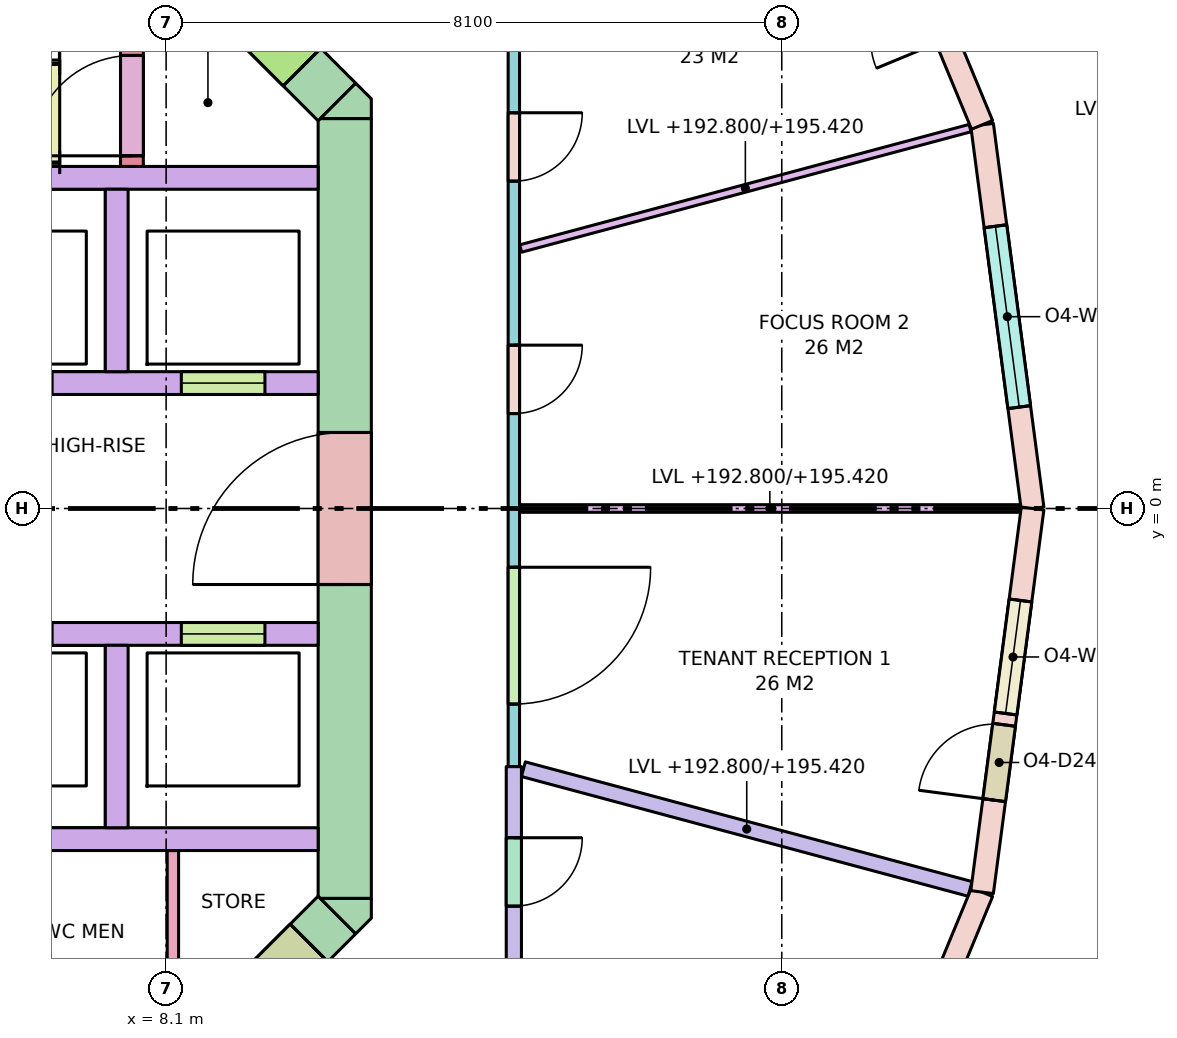
"""IFC4 building model, lengths in metres.
Left out: names, types, materials, properties, quantities, classifications, styles, units other than length and angle.
Written with IfcOpenShell. Run it as: python <this file> out.ifc"""

import sys

from ifc_helpers import new_model, si_unit, direction, frame, frame_2d, origin, place, context, subcontext, project, spatial, polyline, rectangle, outline, extrude, element, fill, save


model = new_model("IFC4")
c1 = context("Model", 3, precision=1e-05, world=origin(), true_north=direction((0.0, 1.0)))
c2 = subcontext(c1, "Body", "Model", "MODEL_VIEW")
j1 = project(units=[si_unit("LENGTHUNIT", "METRE"), si_unit("PLANEANGLEUNIT", "RADIAN")], contexts=[c1])
p1 = place(None, origin())
s1 = spatial("IfcSite", under=j1, at=p1, CompositionType="ELEMENT")
p2 = place(p1, origin())
s2 = spatial("IfcBuilding", under=s1, at=p2, CompositionType="ELEMENT")
p3 = place(p2, frame((0.0, 0.0, 192.8)))
s3 = spatial("IfcBuildingStorey", under=s2, at=p3, CompositionType="ELEMENT", Elevation=192.8)
p4 = place(p3, frame((10.45, -5.13, -0.28), z_axis=(0.0, 0.0, 1.0), x_axis=(0.0, 1.0, 0.0)))
e1 = element("IfcWall", 1, at=p4, inside=s3, PredefinedType="SHEAR", context=c2, shape_type="SweptSolid", body=[
    extrude(rectangle(XDim=10.26, YDim=0.7, at=frame_2d((5.13, 0.0))), origin(), (0.0, 0.0, 1.0), 3.7),
])
p5 = place(p4, frame((4.13, 0.0, 0.28)))
e2 = element("IfcOpeningElement", 2, at=p5, cuts=e1, PredefinedType="OPENING", context=c2, shape_type="SweptSolid", body=[
    extrude(rectangle(XDim=2.0, YDim=2.1, at=frame_2d((1.0, 1.05))), frame((0.0, 0.36, 0.0), z_axis=(0.0, -1.0, 0.0), x_axis=(1.0, 0.0, 0.0)), (0.0, 0.0, 1.0), 0.72),
])
p6 = place(p3, frame((7.347, 8.347, -0.28), z_axis=(0.0, 0.0, 1.0), x_axis=(0.707106781187, -0.707106781187, 0.0)))
e3 = element("IfcWall", 3, at=p6, inside=s3, PredefinedType="SHEAR", context=c2, shape_type="SweptSolid", body=[
    extrude(rectangle(XDim=4.243, YDim=0.7, at=frame_2d((2.121, 0.0))), origin(), (0.0, 0.0, 1.0), 3.7),
])
p7 = place(p6, frame((2.393, 0.0, 0.28)))
e4 = element("IfcOpeningElement", 4, at=p7, cuts=e3, PredefinedType="OPENING", context=c2, shape_type="SweptSolid", body=[
    extrude(rectangle(XDim=1.2, YDim=2.1, at=frame_2d((0.6, 1.05))), frame((0.0, 0.36, 0.0), z_axis=(0.0, -1.0, 0.0), x_axis=(1.0, 0.0, 0.0)), (0.0, 0.0, 1.0), 0.72),
])
p8 = place(p3, frame((10.347, -5.347, -0.28), z_axis=(0.0, 0.0, 1.0), x_axis=(-0.707106781187, -0.707106781187, 0.0)))
e5 = element("IfcWall", 5, at=p8, inside=s3, PredefinedType="SHEAR", context=c2, shape_type="SweptSolid", body=[
    extrude(rectangle(XDim=4.243, YDim=0.7, at=frame_2d((2.121, 0.0))), origin(), (0.0, 0.0, 1.0), 3.7),
])
p9 = place(p8, frame((2.823, 0.0, 0.28)))
e6 = element("IfcOpeningElement", 6, at=p9, cuts=e5, PredefinedType="OPENING", context=c2, shape_type="SweptSolid", body=[
    extrude(rectangle(XDim=0.9, YDim=2.1, at=frame_2d((0.45, 1.05))), frame((0.0, 0.36, 0.0), z_axis=(0.0, -1.0, 0.0), x_axis=(1.0, 0.0, 0.0)), (0.0, 0.0, 1.0), 0.72),
])
p10 = place(p8, frame((0.52, 0.0, 0.28)))
e7 = element("IfcOpeningElement", 7, at=p10, cuts=e5, PredefinedType="OPENING", context=c2, shape_type="SweptSolid", body=[
    extrude(rectangle(XDim=0.9, YDim=2.1, at=frame_2d((0.45, 1.05))), frame((0.0, 0.36, 0.0), z_axis=(0.0, -1.0, 0.0), x_axis=(1.0, 0.0, 0.0)), (0.0, 0.0, 1.0), 0.72),
])
p11 = place(p3, frame((0.0, 0.0, -0.28)))
e8 = element("IfcWall", 8, at=p11, inside=s3, PredefinedType="SHEAR", context=c2, shape_type="SweptSolid", body=[
    extrude(outline(polyline([(10.8, -5.39), (10.595, -5.595), (10.595, -5.595), (10.595, -5.595), (10.13, -5.13), (10.8, -5.13), (10.8, -5.13), (10.8, -5.39)])), origin(), (0.0, 0.0, 1.0), 3.7),
])
p12 = place(p3, frame((0.0, 0.0, -0.28)))
e9 = element("IfcWall", 9, at=p12, inside=s3, PredefinedType="SHEAR", context=c2, shape_type="SweptSolid", body=[
    extrude(outline(polyline([(10.8, 5.39), (10.8, 5.13), (10.8, 5.13), (10.13, 5.13), (10.595, 5.595), (10.595, 5.595), (10.595, 5.595), (10.8, 5.39)])), origin(), (0.0, 0.0, 1.0), 3.7),
])
for number, where, z_axis, x_axis in (
    (10, (2.0, 4.35, 0.0), (0.0, 0.0, 1.0), (1.0, 0.0, 0.0)),
    (11, (2.0, -4.35, 0.0), (0.0, 0.0, 1.0), (1.0, 0.0, 0.0)),
):
    element("IfcWall", number, at=place(p3, frame(where, z_axis=z_axis, x_axis=x_axis)), inside=s3, PredefinedType="SOLIDWALL", context=c2, shape_type="SweptSolid", body=[
        extrude(rectangle(XDim=8.1, YDim=0.3, at=frame_2d((4.05, 0.0))), origin(), (0.0, 0.0, 1.0), 3.42),
    ])
p13 = place(p3, frame((2.0, 1.65, 0.0), z_axis=(0.0, 0.0, 1.0), x_axis=(1.0, 0.0, 0.0)))
e12 = element("IfcWall", 12, at=p13, inside=s3, PredefinedType="SOLIDWALL", context=c2, shape_type="SweptSolid", body=[
    extrude(rectangle(XDim=8.1, YDim=0.3, at=frame_2d((4.05, 0.0))), origin(), (0.0, 0.0, 1.0), 3.42),
])
p14 = place(p13, frame((0.85, 0.0, 0.0)))
e13 = element("IfcOpeningElement", 13, at=p14, cuts=e12, PredefinedType="OPENING", context=c2, shape_type="SweptSolid", body=[
    extrude(rectangle(XDim=1.1, YDim=2.1, at=frame_2d((0.55, 1.05))), frame((0.0, 0.16, 0.0), z_axis=(0.0, -1.0, 0.0), x_axis=(1.0, 0.0, 0.0)), (0.0, 0.0, 1.0), 0.32),
])
p15 = place(p13, frame((3.5, 0.0, 0.0)))
e14 = element("IfcOpeningElement", 14, at=p15, cuts=e12, PredefinedType="OPENING", context=c2, shape_type="SweptSolid", body=[
    extrude(rectangle(XDim=1.1, YDim=2.1, at=frame_2d((0.55, 1.05))), frame((0.0, 0.16, 0.0), z_axis=(0.0, -1.0, 0.0), x_axis=(1.0, 0.0, 0.0)), (0.0, 0.0, 1.0), 0.32),
])
p16 = place(p13, frame((6.3, 0.0, 0.0)))
e15 = element("IfcOpeningElement", 15, at=p16, cuts=e12, PredefinedType="OPENING", context=c2, shape_type="SweptSolid", body=[
    extrude(rectangle(XDim=1.1, YDim=2.1, at=frame_2d((0.55, 1.05))), frame((0.0, 0.16, 0.0), z_axis=(0.0, -1.0, 0.0), x_axis=(1.0, 0.0, 0.0)), (0.0, 0.0, 1.0), 0.32),
])
p17 = place(p3, frame((2.0, -1.65, 0.0), z_axis=(0.0, 0.0, 1.0), x_axis=(1.0, 0.0, 0.0)))
e16 = element("IfcWall", 16, at=p17, inside=s3, PredefinedType="SOLIDWALL", context=c2, shape_type="SweptSolid", body=[
    extrude(rectangle(XDim=8.1, YDim=0.3, at=frame_2d((4.05, 0.0))), origin(), (0.0, 0.0, 1.0), 3.42),
])
p18 = place(p17, frame((0.85, 0.0, 0.0)))
e17 = element("IfcOpeningElement", 17, at=p18, cuts=e16, PredefinedType="OPENING", context=c2, shape_type="SweptSolid", body=[
    extrude(rectangle(XDim=1.1, YDim=2.1, at=frame_2d((0.55, 1.05))), frame((0.0, 0.16, 0.0), z_axis=(0.0, -1.0, 0.0), x_axis=(1.0, 0.0, 0.0)), (0.0, 0.0, 1.0), 0.32),
])
p19 = place(p17, frame((3.5, 0.0, 0.0)))
e18 = element("IfcOpeningElement", 18, at=p19, cuts=e16, PredefinedType="OPENING", context=c2, shape_type="SweptSolid", body=[
    extrude(rectangle(XDim=1.1, YDim=2.1, at=frame_2d((0.55, 1.05))), frame((0.0, 0.16, 0.0), z_axis=(0.0, -1.0, 0.0), x_axis=(1.0, 0.0, 0.0)), (0.0, 0.0, 1.0), 0.32),
])
p20 = place(p17, frame((6.3, 0.0, 0.0)))
e19 = element("IfcOpeningElement", 19, at=p20, cuts=e16, PredefinedType="OPENING", context=c2, shape_type="SweptSolid", body=[
    extrude(rectangle(XDim=1.1, YDim=2.1, at=frame_2d((0.55, 1.05))), frame((0.0, 0.16, 0.0), z_axis=(0.0, -1.0, 0.0), x_axis=(1.0, 0.0, 0.0)), (0.0, 0.0, 1.0), 0.32),
])
for number, where, z_axis, x_axis in (
    (20, (7.45, 1.8, 0.0), (0.0, 0.0, 1.0), (0.0, 1.0, 0.0)),
    (21, (7.45, -4.2, 0.0), (0.0, 0.0, 1.0), (0.0, 1.0, 0.0)),
):
    element("IfcWall", number, at=place(p3, frame(where, z_axis=z_axis, x_axis=x_axis)), inside=s3, PredefinedType="SOLIDWALL", context=c2, shape_type="SweptSolid", body=[
        extrude(rectangle(XDim=2.4, YDim=0.3, at=frame_2d((1.2, 0.0))), origin(), (0.0, 0.0, 1.0), 3.42),
    ])
p21 = place(p3, frame((7.65, 4.5, 0.0), z_axis=(0.0, 0.0, 1.0), x_axis=(0.0, 1.0, 0.0)))
e22 = element("IfcWall", 22, at=p21, inside=s3, PredefinedType="SHEAR", context=c2, shape_type="SweptSolid", body=[
    extrude(rectangle(XDim=3.14, YDim=0.3, at=frame_2d((1.57, 0.0))), origin(), (0.0, 0.0, 1.0), 3.42),
])
p22 = place(p21, frame((0.14, 0.0, 0.0)))
e23 = element("IfcOpeningElement", 23, at=p22, cuts=e22, PredefinedType="OPENING", context=c2, shape_type="SweptSolid", body=[
    extrude(rectangle(XDim=1.32, YDim=2.1, at=frame_2d((0.66, 1.05))), frame((0.0, 0.16, 0.0), z_axis=(0.0, -1.0, 0.0), x_axis=(1.0, 0.0, 0.0)), (0.0, 0.0, 1.0), 0.32),
])
p23 = place(p3, frame((19.5, 0.0, 0.0), z_axis=(0.0, 0.0, 1.0), x_axis=(-0.130495451964, 0.99144890792, 0.0)))
e24 = element("IfcWall", 24, at=p23, inside=s3, PredefinedType="STANDARD", context=c2, shape_type="SweptSolid", body=[
    extrude(rectangle(XDim=5.091, YDim=0.3, at=frame_2d((2.545, 0.0))), origin(), (0.0, 0.0, 1.0), 3.42),
])
p24 = place(p23, frame((1.345, 0.0, 0.8)))
e25 = element("IfcOpeningElement", 25, at=p24, cuts=e24, PredefinedType="OPENING", context=c2, shape_type="SweptSolid", body=[
    extrude(rectangle(XDim=2.4, YDim=2.4, at=frame_2d((1.2, 1.2))), frame((0.0, 0.16, 0.0), z_axis=(0.0, -1.0, 0.0), x_axis=(1.0, 0.0, 0.0)), (0.0, 0.0, 1.0), 0.32),
])
p25 = place(p3, frame((18.836, 5.047, 0.0), z_axis=(0.0, 0.0, 1.0), x_axis=(-0.382724538613, 0.923862504675, 0.0)))
e26 = element("IfcWall", 26, at=p25, inside=s3, PredefinedType="STANDARD", context=c2, shape_type="SweptSolid", body=[
    extrude(rectangle(XDim=5.091, YDim=0.3, at=frame_2d((2.545, 0.0))), origin(), (0.0, 0.0, 1.0), 3.42),
])
p26 = place(p25, frame((1.22, 0.0, 0.0)))
e27 = element("IfcOpeningElement", 27, at=p26, cuts=e26, PredefinedType="OPENING", context=c2, shape_type="SweptSolid", body=[
    extrude(rectangle(XDim=1.0, YDim=2.4, at=frame_2d((0.5, 1.2))), frame((0.0, 0.16, 0.0), z_axis=(0.0, -1.0, 0.0), x_axis=(1.0, 0.0, 0.0)), (0.0, 0.0, 1.0), 0.32),
])
p27 = place(p25, frame((2.37, 0.0, 0.8)))
e28 = element("IfcOpeningElement", 28, at=p27, cuts=e26, PredefinedType="OPENING", context=c2, shape_type="SweptSolid", body=[
    extrude(rectangle(XDim=1.5, YDim=2.4, at=frame_2d((0.75, 1.2))), frame((0.0, 0.16, 0.0), z_axis=(0.0, -1.0, 0.0), x_axis=(1.0, 0.0, 0.0)), (0.0, 0.0, 1.0), 0.32),
])
p28 = place(p3, frame((16.887, -9.75, 0.0), z_axis=(0.0, 0.0, 1.0), x_axis=(0.382724538613, 0.923862504675, 0.0)))
e29 = element("IfcWall", 29, at=p28, inside=s3, PredefinedType="STANDARD", context=c2, shape_type="SweptSolid", body=[
    extrude(rectangle(XDim=5.091, YDim=0.3, at=frame_2d((2.545, 0.0))), origin(), (0.0, 0.0, 1.0), 3.42),
])
p29 = place(p28, frame((1.345, 0.0, 0.8)))
e30 = element("IfcOpeningElement", 30, at=p29, cuts=e29, PredefinedType="OPENING", context=c2, shape_type="SweptSolid", body=[
    extrude(rectangle(XDim=2.4, YDim=2.4, at=frame_2d((1.2, 1.2))), frame((0.0, 0.16, 0.0), z_axis=(0.0, -1.0, 0.0), x_axis=(1.0, 0.0, 0.0)), (0.0, 0.0, 1.0), 0.32),
])
p30 = place(p3, frame((18.836, -5.047, 0.0), z_axis=(0.0, 0.0, 1.0), x_axis=(0.130495451964, 0.99144890792, 0.0)))
e31 = element("IfcWall", 31, at=p30, inside=s3, PredefinedType="STANDARD", context=c2, shape_type="SweptSolid", body=[
    extrude(rectangle(XDim=5.091, YDim=0.3, at=frame_2d((2.545, 0.0))), origin(), (0.0, 0.0, 1.0), 3.42),
])
p31 = place(p30, frame((1.22, 0.0, 0.0)))
e32 = element("IfcOpeningElement", 32, at=p31, cuts=e31, PredefinedType="OPENING", context=c2, shape_type="SweptSolid", body=[
    extrude(rectangle(XDim=1.0, YDim=2.4, at=frame_2d((0.5, 1.2))), frame((0.0, 0.16, 0.0), z_axis=(0.0, -1.0, 0.0), x_axis=(1.0, 0.0, 0.0)), (0.0, 0.0, 1.0), 0.32),
])
p32 = place(p30, frame((2.37, 0.0, 0.8)))
e33 = element("IfcOpeningElement", 33, at=p32, cuts=e31, PredefinedType="OPENING", context=c2, shape_type="SweptSolid", body=[
    extrude(rectangle(XDim=1.5, YDim=2.4, at=frame_2d((0.75, 1.2))), frame((0.0, 0.16, 0.0), z_axis=(0.0, -1.0, 0.0), x_axis=(1.0, 0.0, 0.0)), (0.0, 0.0, 1.0), 0.32),
])
p33 = place(p3, frame((8.189, -6.936, 0.0), z_axis=(0.0, 0.0, 1.0), x_axis=(0.0, 1.0, 0.0)))
e34 = element("IfcWall", 34, at=p33, inside=s3, PredefinedType="PARTITIONING", context=c2, shape_type="SweptSolid", body=[
    extrude(rectangle(XDim=2.436, YDim=0.15, at=frame_2d((1.218, 0.0))), origin(), (0.0, 0.0, 1.0), 3.42),
])
p34 = place(p3, frame((12.675, 6.167, 0.0), z_axis=(0.0, 0.0, 1.0), x_axis=(0.0, -1.0, 0.0)))
e35 = element("IfcWall", 35, at=p34, inside=s3, PredefinedType="PARTITIONING", context=c2, shape_type="SweptSolid", body=[
    extrude(rectangle(XDim=9.563, YDim=0.15, at=frame_2d((4.781, 0.0))), origin(), (0.0, 0.0, 1.0), 2.62),
])
p35 = place(p34, frame((6.94, 0.0, 0.0)))
e36 = element("IfcOpeningElement", 36, at=p35, cuts=e35, PredefinedType="OPENING", context=c2, shape_type="SweptSolid", body=[
    extrude(rectangle(XDim=1.8, YDim=2.1, at=frame_2d((0.9, 1.05))), frame((0.0, 0.085, 0.0), z_axis=(0.0, -1.0, 0.0), x_axis=(1.0, 0.0, 0.0)), (0.0, 0.0, 1.0), 0.17),
])
p36 = place(p34, frame((4.018, 0.0, 0.0)))
e37 = element("IfcOpeningElement", 37, at=p36, cuts=e35, PredefinedType="OPENING", context=c2, shape_type="SweptSolid", body=[
    extrude(rectangle(XDim=0.9, YDim=2.1, at=frame_2d((0.45, 1.05))), frame((0.0, 0.085, 0.0), z_axis=(0.0, -1.0, 0.0), x_axis=(1.0, 0.0, 0.0)), (0.0, 0.0, 1.0), 0.17),
])
p37 = place(p34, frame((0.96, 0.0, 0.0)))
e38 = element("IfcOpeningElement", 38, at=p37, cuts=e35, PredefinedType="OPENING", context=c2, shape_type="SweptSolid", body=[
    extrude(rectangle(XDim=0.9, YDim=2.1, at=frame_2d((0.45, 1.05))), frame((0.0, 0.085, 0.0), z_axis=(0.0, -1.0, 0.0), x_axis=(1.0, 0.0, 0.0)), (0.0, 0.0, 1.0), 0.17),
])
p38 = place(p3, frame((12.675, -3.396, 0.0), z_axis=(0.0, 0.0, 1.0), x_axis=(0.0, -1.0, 0.0)))
e39 = element("IfcWall", 39, at=p38, inside=s3, PredefinedType="PARTITIONING", context=c2, shape_type="SweptSolid", body=[
    extrude(rectangle(XDim=2.77, YDim=0.2, at=frame_2d((1.385, 0.0))), origin(), (0.0, 0.0, 1.0), 2.62),
])
p39 = place(p38, frame((0.935, 0.0, 0.0)))
e40 = element("IfcOpeningElement", 40, at=p39, cuts=e39, PredefinedType="OPENING", context=c2, shape_type="SweptSolid", body=[
    extrude(rectangle(XDim=0.9, YDim=2.1, at=frame_2d((0.45, 1.05))), frame((0.0, 0.11, 0.0), z_axis=(0.0, -1.0, 0.0), x_axis=(1.0, 0.0, 0.0)), (0.0, 0.0, 1.0), 0.22),
])
p40 = place(p3, frame((12.75, 0.0, 0.0), z_axis=(0.0, 0.0, 1.0), x_axis=(1.0, 0.0, 0.0)))
e41 = element("IfcWall", 41, at=p40, inside=s3, PredefinedType="PARTITIONING", context=c2, shape_type="SweptSolid", body=[
    extrude(rectangle(XDim=6.587, YDim=0.1, at=frame_2d((3.293, 0.0))), origin(), (0.0, 0.0, 1.0), 2.62),
])
p41 = place(p3, frame((12.764, 3.42, 0.0), z_axis=(0.0, 0.0, 1.0), x_axis=(0.965925800266, 0.258819142221, 0.0)))
e42 = element("IfcWall", 42, at=p41, inside=s3, PredefinedType="PARTITIONING", context=c2, shape_type="SweptSolid", body=[
    extrude(rectangle(XDim=6.122, YDim=0.1, at=frame_2d((3.061, 0.0))), origin(), (0.0, 0.0, 1.0), 2.62),
])
p42 = place(p3, frame((12.801, -3.43, 0.0), z_axis=(0.0, 0.0, 1.0), x_axis=(0.965929245953, -0.258806282407, 0.0)))
e43 = element("IfcWall", 43, at=p42, inside=s3, PredefinedType="PARTITIONING", context=c2, shape_type="SweptSolid", body=[
    extrude(rectangle(XDim=6.084, YDim=0.2, at=frame_2d((3.042, 0.0))), origin(), (0.0, 0.0, 1.0), 2.62),
])
p43 = place(p24, origin())
e44 = element("IfcWindow", 44, at=p43, inside=s3, PartitioningType="SINGLE_PANEL", PredefinedType="WINDOW", context=c2, shape_type="SweptSolid", body=[
    extrude(rectangle(XDim=2.4, YDim=2.4, at=frame_2d((1.2, 1.2))), frame((0.0, 0.03, 0.0), z_axis=(0.0, -1.0, 0.0), x_axis=(1.0, 0.0, 0.0)), (0.0, 0.0, 1.0), 0.06),
])
fill(e25, e44)
p44 = place(p31, origin())
e45 = element("IfcDoor", 45, at=p44, inside=s3, OperationType="SINGLE_SWING_LEFT", PredefinedType="DOOR", context=c2, shape_type="SweptSolid", body=[
    extrude(rectangle(XDim=1.0, YDim=2.4, at=frame_2d((0.5, 1.2))), frame((0.0, 0.025, 0.0), z_axis=(0.0, -1.0, 0.0), x_axis=(1.0, 0.0, 0.0)), (0.0, 0.0, 1.0), 0.05),
])
fill(e32, e45)
p45 = place(p32, origin())
e46 = element("IfcWindow", 46, at=p45, inside=s3, PartitioningType="SINGLE_PANEL", PredefinedType="WINDOW", context=c2, shape_type="SweptSolid", body=[
    extrude(rectangle(XDim=1.5, YDim=2.4, at=frame_2d((0.75, 1.2))), frame((0.0, 0.03, 0.0), z_axis=(0.0, -1.0, 0.0), x_axis=(1.0, 0.0, 0.0)), (0.0, 0.0, 1.0), 0.06),
])
fill(e33, e46)
p46 = place(p16, origin())
e47 = element("IfcDoor", 47, at=p46, inside=s3, OperationType="DOUBLE_DOOR_SLIDING", PredefinedType="DOOR", context=c2, shape_type="SweptSolid", body=[
    extrude(rectangle(XDim=1.1, YDim=2.1, at=frame_2d((0.55, 1.05))), frame((0.0, 0.025, 0.0), z_axis=(0.0, -1.0, 0.0), x_axis=(1.0, 0.0, 0.0)), (0.0, 0.0, 1.0), 0.05),
])
fill(e15, e47)
p47 = place(p20, origin())
e48 = element("IfcDoor", 48, at=p47, inside=s3, OperationType="DOUBLE_DOOR_SLIDING", PredefinedType="DOOR", context=c2, shape_type="SweptSolid", body=[
    extrude(rectangle(XDim=1.1, YDim=2.1, at=frame_2d((0.55, 1.05))), frame((0.0, 0.025, 0.0), z_axis=(0.0, -1.0, 0.0), x_axis=(1.0, 0.0, 0.0)), (0.0, 0.0, 1.0), 0.05),
])
fill(e19, e48)
p48 = place(p22, origin())
e49 = element("IfcDoor", 49, at=p48, inside=s3, OperationType="DOUBLE_DOOR_SINGLE_SWING", PredefinedType="DOOR", context=c2, shape_type="SweptSolid", body=[
    extrude(rectangle(XDim=1.32, YDim=2.1, at=frame_2d((0.66, 1.05))), frame((0.0, 0.025, 0.0), z_axis=(0.0, -1.0, 0.0), x_axis=(1.0, 0.0, 0.0)), (0.0, 0.0, 1.0), 0.05),
])
fill(e23, e49)
p49 = place(p7, origin())
e50 = element("IfcDoor", 50, at=p49, inside=s3, OperationType="SINGLE_SWING_RIGHT", PredefinedType="DOOR", context=c2, shape_type="SweptSolid", body=[
    extrude(rectangle(XDim=1.2, YDim=2.1, at=frame_2d((0.6, 1.05))), frame((0.0, 0.025, 0.0), z_axis=(0.0, -1.0, 0.0), x_axis=(1.0, 0.0, 0.0)), (0.0, 0.0, 1.0), 0.05),
])
fill(e4, e50)
p50 = place(p5, origin())
e51 = element("IfcDoor", 51, at=p50, inside=s3, OperationType="DOUBLE_DOOR_SINGLE_SWING", PredefinedType="DOOR", context=c2, shape_type="SweptSolid", body=[
    extrude(rectangle(XDim=2.0, YDim=2.1, at=frame_2d((1.0, 1.05))), frame((0.0, 0.025, 0.0), z_axis=(0.0, -1.0, 0.0), x_axis=(1.0, 0.0, 0.0)), (0.0, 0.0, 1.0), 0.05),
])
fill(e2, e51)
p51 = place(p10, origin())
e52 = element("IfcDoor", 52, at=p51, inside=s3, OperationType="SINGLE_SWING_LEFT", PredefinedType="DOOR", context=c2, shape_type="SweptSolid", body=[
    extrude(rectangle(XDim=0.9, YDim=2.1, at=frame_2d((0.45, 1.05))), frame((0.0, 0.025, 0.0), z_axis=(0.0, -1.0, 0.0), x_axis=(1.0, 0.0, 0.0)), (0.0, 0.0, 1.0), 0.05),
])
fill(e7, e52)
p52 = place(p39, origin())
e53 = element("IfcDoor", 53, at=p52, inside=s3, OperationType="SINGLE_SWING_LEFT", PredefinedType="DOOR", context=c2, shape_type="SweptSolid", body=[
    extrude(rectangle(XDim=0.9, YDim=2.1, at=frame_2d((0.45, 1.05))), frame((0.0, 0.025, 0.0), z_axis=(0.0, -1.0, 0.0), x_axis=(1.0, 0.0, 0.0)), (0.0, 0.0, 1.0), 0.05),
])
fill(e40, e53)
p53 = place(p35, origin())
e54 = element("IfcDoor", 54, at=p53, inside=s3, OperationType="DOUBLE_DOOR_SINGLE_SWING", PredefinedType="DOOR", context=c2, shape_type="SweptSolid", body=[
    extrude(rectangle(XDim=1.8, YDim=2.1, at=frame_2d((0.9, 1.05))), frame((0.0, 0.025, 0.0), z_axis=(0.0, -1.0, 0.0), x_axis=(1.0, 0.0, 0.0)), (0.0, 0.0, 1.0), 0.05),
])
fill(e36, e54)
p54 = place(p36, origin())
e55 = element("IfcDoor", 55, at=p54, inside=s3, OperationType="SINGLE_SWING_LEFT", PredefinedType="DOOR", context=c2, shape_type="SweptSolid", body=[
    extrude(rectangle(XDim=0.9, YDim=2.1, at=frame_2d((0.45, 1.05))), frame((0.0, 0.025, 0.0), z_axis=(0.0, -1.0, 0.0), x_axis=(1.0, 0.0, 0.0)), (0.0, 0.0, 1.0), 0.05),
])
fill(e37, e55)
p55 = place(p37, origin())
e56 = element("IfcDoor", 56, at=p55, inside=s3, OperationType="SINGLE_SWING_LEFT", PredefinedType="DOOR", context=c2, shape_type="SweptSolid", body=[
    extrude(rectangle(XDim=0.9, YDim=2.1, at=frame_2d((0.45, 1.05))), frame((0.0, 0.025, 0.0), z_axis=(0.0, -1.0, 0.0), x_axis=(1.0, 0.0, 0.0)), (0.0, 0.0, 1.0), 0.05),
])
fill(e38, e56)
save(model, sys.argv[1])
